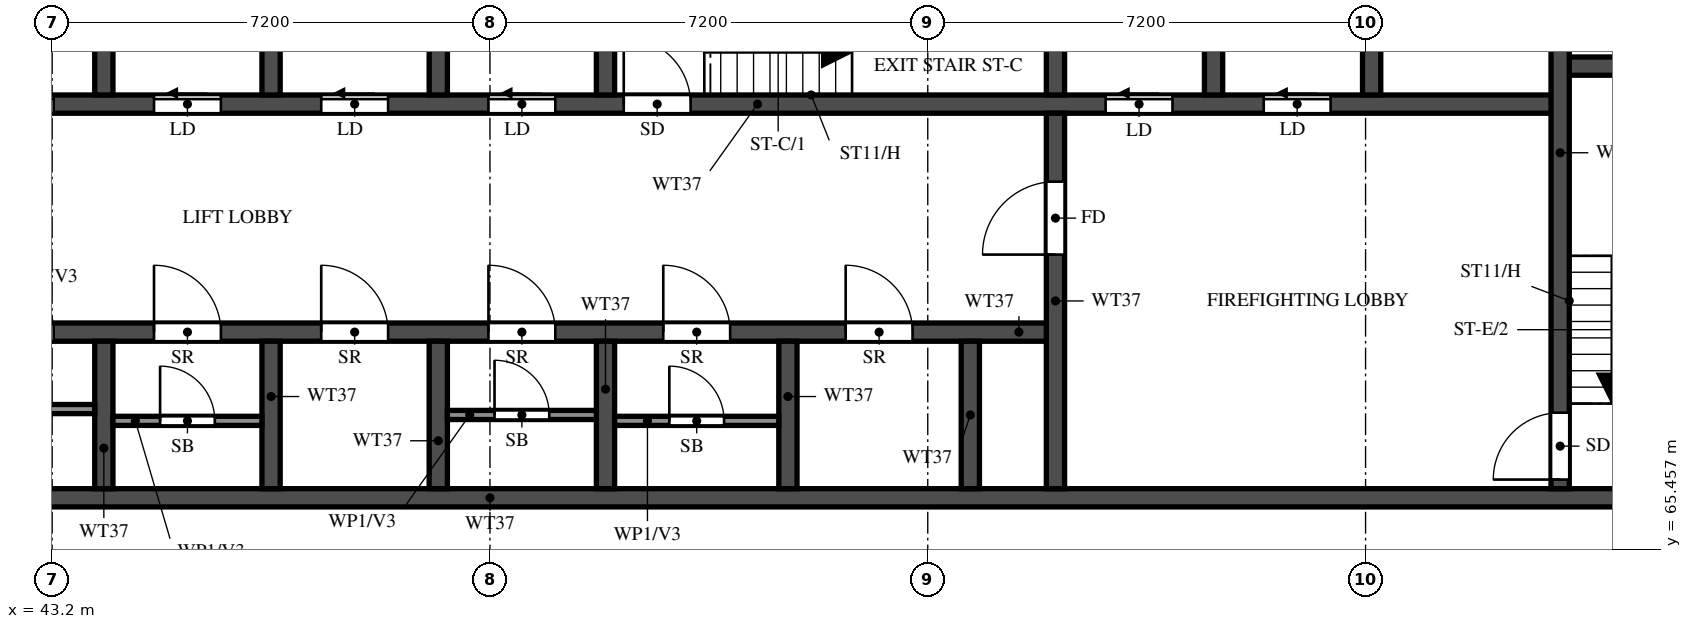
"""IFC4 building model, lengths in metres.
Left out: names, types, materials, properties, quantities, classifications, styles, units other than length and angle.
Written with IfcOpenShell. Run it as: python <this file> out.ifc"""

import sys

from ifc_helpers import new_model, si_unit, direction, frame, frame_2d, origin, place, context, subcontext, project, spatial, rectangle, extrude, element, fill, save


model = new_model("IFC4")
c1 = context("Model", 3, precision=1e-05, world=origin(), true_north=direction((0.0, 1.0)))
c2 = subcontext(c1, "Body", "Model", "MODEL_VIEW")
j1 = project(units=[si_unit("LENGTHUNIT", "METRE"), si_unit("PLANEANGLEUNIT", "RADIAN")], contexts=[c1])
p1 = place(None, origin())
s1 = spatial("IfcSite", under=j1, at=p1, CompositionType="ELEMENT")
p2 = place(p1, origin())
s2 = spatial("IfcBuilding", under=s1, at=p2, CompositionType="ELEMENT")
p3 = place(p2, frame((0.0, 0.0, 253.5)))
s3 = spatial("IfcBuildingStorey", under=s2, at=p3, CompositionType="ELEMENT", Elevation=253.5)
p4 = place(p3, frame((29.2, 66.3, 0.0), z_axis=(0.0, 0.0, 1.0), x_axis=(1.0, 0.0, 0.0)))
e1 = element("IfcWall", 1, at=p4, inside=s3, PredefinedType="SHEAR", context=c2, shape_type="SweptSolid", body=[
    extrude(rectangle(XDim=42.4, YDim=0.3, at=frame_2d((21.2, 0.0))), origin(), (0.0, 0.0, 1.0), 3.22),
])
p5 = place(p4, frame((1.425, 0.0, 0.0)))
e2 = element("IfcOpeningElement", 2, at=p5, cuts=e1, PredefinedType="OPENING", context=c2, shape_type="SweptSolid", body=[
    extrude(rectangle(XDim=1.1, YDim=2.1, at=frame_2d((0.55, 1.05))), frame((0.0, 0.16, 0.0), z_axis=(0.0, -1.0, 0.0), x_axis=(1.0, 0.0, 0.0)), (0.0, 0.0, 1.0), 0.32),
])
p6 = place(p4, frame((4.2, 0.0, 0.0)))
e3 = element("IfcOpeningElement", 3, at=p6, cuts=e1, PredefinedType="OPENING", context=c2, shape_type="SweptSolid", body=[
    extrude(rectangle(XDim=1.8, YDim=2.1, at=frame_2d((0.9, 1.05))), frame((0.0, 0.16, 0.0), z_axis=(0.0, -1.0, 0.0), x_axis=(1.0, 0.0, 0.0)), (0.0, 0.0, 1.0), 0.32),
])
p7 = place(p3, frame((35.65, 69.025, 0.0), z_axis=(0.0, 0.0, 1.0), x_axis=(1.0, 0.0, 0.0)))
e4 = element("IfcWall", 4, at=p7, inside=s3, PredefinedType="SHEAR", context=c2, shape_type="SweptSolid", body=[
    extrude(rectangle(XDim=24.05, YDim=0.3, at=frame_2d((12.025, 0.0))), origin(), (0.0, 0.0, 1.0), 3.22),
])
p8 = place(p7, frame((0.975, 0.0, 0.0)))
e5 = element("IfcOpeningElement", 5, at=p8, cuts=e4, PredefinedType="OPENING", context=c2, shape_type="SweptSolid", body=[
    extrude(rectangle(XDim=1.1, YDim=2.1, at=frame_2d((0.55, 1.05))), frame((0.0, 0.16, 0.0), z_axis=(0.0, -1.0, 0.0), x_axis=(1.0, 0.0, 0.0)), (0.0, 0.0, 1.0), 0.32),
])
p9 = place(p7, frame((3.725, 0.0, 0.0)))
e6 = element("IfcOpeningElement", 6, at=p9, cuts=e4, PredefinedType="OPENING", context=c2, shape_type="SweptSolid", body=[
    extrude(rectangle(XDim=1.1, YDim=2.1, at=frame_2d((0.55, 1.05))), frame((0.0, 0.16, 0.0), z_axis=(0.0, -1.0, 0.0), x_axis=(1.0, 0.0, 0.0)), (0.0, 0.0, 1.0), 0.32),
])
p10 = place(p7, frame((6.475, 0.0, 0.0)))
e7 = element("IfcOpeningElement", 7, at=p10, cuts=e4, PredefinedType="OPENING", context=c2, shape_type="SweptSolid", body=[
    extrude(rectangle(XDim=1.1, YDim=2.1, at=frame_2d((0.55, 1.05))), frame((0.0, 0.16, 0.0), z_axis=(0.0, -1.0, 0.0), x_axis=(1.0, 0.0, 0.0)), (0.0, 0.0, 1.0), 0.32),
])
p11 = place(p7, frame((9.225, 0.0, 0.0)))
e8 = element("IfcOpeningElement", 8, at=p11, cuts=e4, PredefinedType="OPENING", context=c2, shape_type="SweptSolid", body=[
    extrude(rectangle(XDim=1.1, YDim=2.1, at=frame_2d((0.55, 1.05))), frame((0.0, 0.16, 0.0), z_axis=(0.0, -1.0, 0.0), x_axis=(1.0, 0.0, 0.0)), (0.0, 0.0, 1.0), 0.32),
])
p12 = place(p7, frame((11.975, 0.0, 0.0)))
e9 = element("IfcOpeningElement", 9, at=p12, cuts=e4, PredefinedType="OPENING", context=c2, shape_type="SweptSolid", body=[
    extrude(rectangle(XDim=1.1, YDim=2.1, at=frame_2d((0.55, 1.05))), frame((0.0, 0.16, 0.0), z_axis=(0.0, -1.0, 0.0), x_axis=(1.0, 0.0, 0.0)), (0.0, 0.0, 1.0), 0.32),
])
p13 = place(p7, frame((14.725, 0.0, 0.0)))
e10 = element("IfcOpeningElement", 10, at=p13, cuts=e4, PredefinedType="OPENING", context=c2, shape_type="SweptSolid", body=[
    extrude(rectangle(XDim=1.1, YDim=2.1, at=frame_2d((0.55, 1.05))), frame((0.0, 0.16, 0.0), z_axis=(0.0, -1.0, 0.0), x_axis=(1.0, 0.0, 0.0)), (0.0, 0.0, 1.0), 0.32),
])
p14 = place(p7, frame((17.6, 0.0, 0.0)))
e11 = element("IfcOpeningElement", 11, at=p14, cuts=e4, PredefinedType="OPENING", context=c2, shape_type="SweptSolid", body=[
    extrude(rectangle(XDim=1.1, YDim=2.1, at=frame_2d((0.55, 1.05))), frame((0.0, 0.16, 0.0), z_axis=(0.0, -1.0, 0.0), x_axis=(1.0, 0.0, 0.0)), (0.0, 0.0, 1.0), 0.32),
])
p15 = place(p7, frame((20.6, 0.0, 0.0)))
e12 = element("IfcOpeningElement", 12, at=p15, cuts=e4, PredefinedType="OPENING", context=c2, shape_type="SweptSolid", body=[
    extrude(rectangle(XDim=1.1, YDim=2.1, at=frame_2d((0.55, 1.05))), frame((0.0, 0.16, 0.0), z_axis=(0.0, -1.0, 0.0), x_axis=(1.0, 0.0, 0.0)), (0.0, 0.0, 1.0), 0.32),
])
p16 = place(p3, frame((32.8, 72.775, 0.0), z_axis=(0.0, 0.0, 1.0), x_axis=(1.0, 0.0, 0.0)))
e13 = element("IfcWall", 13, at=p16, inside=s3, PredefinedType="SHEAR", context=c2, shape_type="SweptSolid", body=[
    extrude(rectangle(XDim=35.2, YDim=0.3, at=frame_2d((17.6, 0.0))), origin(), (0.0, 0.0, 1.0), 3.22),
])
p17 = place(p16, frame((19.8, 0.0, 0.0)))
e14 = element("IfcOpeningElement", 14, at=p17, cuts=e13, PredefinedType="OPENING", context=c2, shape_type="SweptSolid", body=[
    extrude(rectangle(XDim=1.1, YDim=2.1, at=frame_2d((0.55, 1.05))), frame((0.0, 0.16, 0.0), z_axis=(0.0, -1.0, 0.0), x_axis=(1.0, 0.0, 0.0)), (0.0, 0.0, 1.0), 0.32),
])
p18 = place(p16, frame((27.725, 0.0, 0.0)))
e15 = element("IfcOpeningElement", 15, at=p18, cuts=e13, PredefinedType="OPENING", context=c2, shape_type="SweptSolid", body=[
    extrude(rectangle(XDim=1.1, YDim=2.1, at=frame_2d((0.55, 1.05))), frame((0.0, 0.16, 0.0), z_axis=(0.0, -1.0, 0.0), x_axis=(1.0, 0.0, 0.0)), (0.0, 0.0, 1.0), 0.32),
])
p19 = place(p16, frame((30.325, 0.0, 0.0)))
e16 = element("IfcOpeningElement", 16, at=p19, cuts=e13, PredefinedType="OPENING", context=c2, shape_type="SweptSolid", body=[
    extrude(rectangle(XDim=1.1, YDim=2.1, at=frame_2d((0.55, 1.05))), frame((0.0, 0.16, 0.0), z_axis=(0.0, -1.0, 0.0), x_axis=(1.0, 0.0, 0.0)), (0.0, 0.0, 1.0), 0.32),
])
p20 = place(p16, frame((3.825, 0.0, 0.0)))
e17 = element("IfcOpeningElement", 17, at=p20, cuts=e13, PredefinedType="OPENING", context=c2, shape_type="SweptSolid", body=[
    extrude(rectangle(XDim=1.1, YDim=2.1, at=frame_2d((0.55, 1.05))), frame((0.0, 0.16, 0.0), z_axis=(0.0, -1.0, 0.0), x_axis=(1.0, 0.0, 0.0)), (0.0, 0.0, 1.0), 0.32),
])
p21 = place(p16, frame((6.575, 0.0, 0.0)))
e18 = element("IfcOpeningElement", 18, at=p21, cuts=e13, PredefinedType="OPENING", context=c2, shape_type="SweptSolid", body=[
    extrude(rectangle(XDim=1.1, YDim=2.1, at=frame_2d((0.55, 1.05))), frame((0.0, 0.16, 0.0), z_axis=(0.0, -1.0, 0.0), x_axis=(1.0, 0.0, 0.0)), (0.0, 0.0, 1.0), 0.32),
])
p22 = place(p16, frame((9.325, 0.0, 0.0)))
e19 = element("IfcOpeningElement", 19, at=p22, cuts=e13, PredefinedType="OPENING", context=c2, shape_type="SweptSolid", body=[
    extrude(rectangle(XDim=1.1, YDim=2.1, at=frame_2d((0.55, 1.05))), frame((0.0, 0.16, 0.0), z_axis=(0.0, -1.0, 0.0), x_axis=(1.0, 0.0, 0.0)), (0.0, 0.0, 1.0), 0.32),
])
p23 = place(p16, frame((12.075, 0.0, 0.0)))
e20 = element("IfcOpeningElement", 20, at=p23, cuts=e13, PredefinedType="OPENING", context=c2, shape_type="SweptSolid", body=[
    extrude(rectangle(XDim=1.1, YDim=2.1, at=frame_2d((0.55, 1.05))), frame((0.0, 0.16, 0.0), z_axis=(0.0, -1.0, 0.0), x_axis=(1.0, 0.0, 0.0)), (0.0, 0.0, 1.0), 0.32),
])
p24 = place(p16, frame((14.825, 0.0, 0.0)))
e21 = element("IfcOpeningElement", 21, at=p24, cuts=e13, PredefinedType="OPENING", context=c2, shape_type="SweptSolid", body=[
    extrude(rectangle(XDim=1.1, YDim=2.1, at=frame_2d((0.55, 1.05))), frame((0.0, 0.16, 0.0), z_axis=(0.0, -1.0, 0.0), x_axis=(1.0, 0.0, 0.0)), (0.0, 0.0, 1.0), 0.32),
])
p25 = place(p16, frame((17.575, 0.0, 0.0)))
e22 = element("IfcOpeningElement", 22, at=p25, cuts=e13, PredefinedType="OPENING", context=c2, shape_type="SweptSolid", body=[
    extrude(rectangle(XDim=1.1, YDim=2.1, at=frame_2d((0.55, 1.05))), frame((0.0, 0.16, 0.0), z_axis=(0.0, -1.0, 0.0), x_axis=(1.0, 0.0, 0.0)), (0.0, 0.0, 1.0), 0.32),
])
p26 = place(p16, frame((0.95, 0.0, 0.0)))
e23 = element("IfcOpeningElement", 23, at=p26, cuts=e13, PredefinedType="OPENING", context=c2, shape_type="SweptSolid", body=[
    extrude(rectangle(XDim=1.1, YDim=2.1, at=frame_2d((0.55, 1.05))), frame((0.0, 0.16, 0.0), z_axis=(0.0, -1.0, 0.0), x_axis=(1.0, 0.0, 0.0)), (0.0, 0.0, 1.0), 0.32),
])
p27 = place(p3, frame((68.0, 73.4, 0.0), z_axis=(0.0, 0.0, 1.0), x_axis=(1.0, 0.0, 0.0)))
e24 = element("IfcWall", 24, at=p27, inside=s3, PredefinedType="SHEAR", context=c2, shape_type="SweptSolid", body=[
    extrude(rectangle(XDim=3.1, YDim=0.3, at=frame_2d((1.55, 0.0))), origin(), (0.0, 0.0, 1.0), 3.22),
])
p28 = place(p3, frame((68.0, 66.45, 0.0), z_axis=(0.0, 0.0, 1.0), x_axis=(0.0, 1.0, 0.0)))
e25 = element("IfcWall", 25, at=p28, inside=s3, PredefinedType="SHEAR", context=c2, shape_type="SweptSolid", body=[
    extrude(rectangle(XDim=11.05, YDim=0.3, at=frame_2d((5.525, 0.0))), origin(), (0.0, 0.0, 1.0), 3.22),
])
p29 = place(p28, frame((0.15, 0.0, 0.0)))
e26 = element("IfcOpeningElement", 26, at=p29, cuts=e25, PredefinedType="OPENING", context=c2, shape_type="SweptSolid", body=[
    extrude(rectangle(XDim=1.1, YDim=2.1, at=frame_2d((0.55, 1.05))), frame((0.0, 0.16, 0.0), z_axis=(0.0, -1.0, 0.0), x_axis=(1.0, 0.0, 0.0)), (0.0, 0.0, 1.0), 0.32),
])
p30 = place(p3, frame((59.7, 66.45, 0.0), z_axis=(0.0, 0.0, 1.0), x_axis=(0.0, 1.0, 0.0)))
e27 = element("IfcWall", 27, at=p30, inside=s3, PredefinedType="SHEAR", context=c2, shape_type="SweptSolid", body=[
    extrude(rectangle(XDim=6.175, YDim=0.3, at=frame_2d((3.087, 0.0))), origin(), (0.0, 0.0, 1.0), 3.22),
])
p31 = place(p30, frame((3.85, 0.0, 0.0)))
e28 = element("IfcOpeningElement", 28, at=p31, cuts=e27, PredefinedType="OPENING", context=c2, shape_type="SweptSolid", body=[
    extrude(rectangle(XDim=1.2, YDim=2.1, at=frame_2d((0.6, 1.05))), frame((0.0, 0.16, 0.0), z_axis=(0.0, -1.0, 0.0), x_axis=(1.0, 0.0, 0.0)), (0.0, 0.0, 1.0), 0.32),
])
p32 = place(p3, frame((59.7, 72.925, 0.0), z_axis=(0.0, 0.0, 1.0), x_axis=(0.0, 1.0, 0.0)))
e29 = element("IfcWall", 29, at=p32, inside=s3, PredefinedType="SHEAR", context=c2, shape_type="SweptSolid", body=[
    extrude(rectangle(XDim=2.95, YDim=0.3, at=frame_2d((1.475, 0.0))), origin(), (0.0, 0.0, 1.0), 3.22),
])
for number, where, z_axis, x_axis in (
    (30, (44.05, 66.45, 0.0), (0.0, 0.0, 1.0), (0.0, 1.0, 0.0)),
    (31, (46.8, 66.45, 0.0), (0.0, 0.0, 1.0), (0.0, 1.0, 0.0)),
    (32, (49.55, 66.45, 0.0), (0.0, 0.0, 1.0), (0.0, 1.0, 0.0)),
    (33, (52.3, 66.45, 0.0), (0.0, 0.0, 1.0), (0.0, 1.0, 0.0)),
    (34, (55.3, 66.45, 0.0), (0.0, 0.0, 1.0), (0.0, 1.0, 0.0)),
    (35, (58.3, 66.45, 0.0), (0.0, 0.0, 1.0), (0.0, 1.0, 0.0)),
):
    element("IfcWall", number, at=place(p3, frame(where, z_axis=z_axis, x_axis=x_axis)), inside=s3, PredefinedType="SHEAR", context=c2, shape_type="SweptSolid", body=[
        extrude(rectangle(XDim=2.425, YDim=0.3, at=frame_2d((1.212, 0.0))), origin(), (0.0, 0.0, 1.0), 3.22),
    ])
for number, where, z_axis, x_axis in (
    (36, (44.05, 72.925, 0.0), (0.0, 0.0, 1.0), (0.0, 1.0, 0.0)),
    (37, (46.8, 72.925, 0.0), (0.0, 0.0, 1.0), (0.0, 1.0, 0.0)),
    (38, (49.55, 72.925, 0.0), (0.0, 0.0, 1.0), (0.0, 1.0, 0.0)),
    (39, (52.3, 72.925, 0.0), (0.0, 0.0, 1.0), (0.0, 1.0, 0.0)),
    (40, (62.3, 72.925, 0.0), (0.0, 0.0, 1.0), (0.0, 1.0, 0.0)),
    (41, (64.9, 72.925, 0.0), (0.0, 0.0, 1.0), (0.0, 1.0, 0.0)),
):
    element("IfcWall", number, at=place(p3, frame(where, z_axis=z_axis, x_axis=x_axis)), inside=s3, PredefinedType="SHEAR", context=c2, shape_type="SweptSolid", body=[
        extrude(rectangle(XDim=2.95, YDim=0.3, at=frame_2d((1.475, 0.0))), origin(), (0.0, 0.0, 1.0), 3.22),
    ])
p33 = place(p3, frame((41.45, 67.76, 0.0), z_axis=(0.0, 0.0, 1.0), x_axis=(1.0, 0.0, 0.0)))
e42 = element("IfcWall", 42, at=p33, inside=s3, PredefinedType="PARTITIONING", context=c2, shape_type="SweptSolid", body=[
    extrude(rectangle(XDim=2.45, YDim=0.15, at=frame_2d((1.225, 0.0))), origin(), (0.0, 0.0, 1.0), 3.22),
])
p34 = place(p33, frame((0.775, 0.0, 0.0)))
e43 = element("IfcOpeningElement", 43, at=p34, cuts=e42, PredefinedType="OPENING", context=c2, shape_type="SweptSolid", body=[
    extrude(rectangle(XDim=0.9, YDim=2.1, at=frame_2d((0.45, 1.05))), frame((0.0, 0.085, 0.0), z_axis=(0.0, -1.0, 0.0), x_axis=(1.0, 0.0, 0.0)), (0.0, 0.0, 1.0), 0.17),
])
p35 = place(p3, frame((44.2, 67.565, 0.0), z_axis=(0.0, 0.0, 1.0), x_axis=(1.0, 0.0, 0.0)))
e44 = element("IfcWall", 44, at=p35, inside=s3, PredefinedType="PARTITIONING", context=c2, shape_type="SweptSolid", body=[
    extrude(rectangle(XDim=2.45, YDim=0.15, at=frame_2d((1.225, 0.0))), origin(), (0.0, 0.0, 1.0), 3.22),
])
p36 = place(p35, frame((0.775, 0.0, 0.0)))
e45 = element("IfcOpeningElement", 45, at=p36, cuts=e44, PredefinedType="OPENING", context=c2, shape_type="SweptSolid", body=[
    extrude(rectangle(XDim=0.9, YDim=2.1, at=frame_2d((0.45, 1.05))), frame((0.0, 0.085, 0.0), z_axis=(0.0, -1.0, 0.0), x_axis=(1.0, 0.0, 0.0)), (0.0, 0.0, 1.0), 0.17),
])
p37 = place(p3, frame((49.7, 67.663, 0.0), z_axis=(0.0, 0.0, 1.0), x_axis=(1.0, 0.0, 0.0)))
e46 = element("IfcWall", 46, at=p37, inside=s3, PredefinedType="PARTITIONING", context=c2, shape_type="SweptSolid", body=[
    extrude(rectangle(XDim=2.45, YDim=0.15, at=frame_2d((1.225, 0.0))), origin(), (0.0, 0.0, 1.0), 3.22),
])
p38 = place(p37, frame((0.775, 0.0, 0.0)))
e47 = element("IfcOpeningElement", 47, at=p38, cuts=e46, PredefinedType="OPENING", context=c2, shape_type="SweptSolid", body=[
    extrude(rectangle(XDim=0.9, YDim=2.1, at=frame_2d((0.45, 1.05))), frame((0.0, 0.085, 0.0), z_axis=(0.0, -1.0, 0.0), x_axis=(1.0, 0.0, 0.0)), (0.0, 0.0, 1.0), 0.17),
])
p39 = place(p3, frame((52.45, 67.565, 0.0), z_axis=(0.0, 0.0, 1.0), x_axis=(1.0, 0.0, 0.0)))
e48 = element("IfcWall", 48, at=p39, inside=s3, PredefinedType="PARTITIONING", context=c2, shape_type="SweptSolid", body=[
    extrude(rectangle(XDim=2.7, YDim=0.15, at=frame_2d((1.35, 0.0))), origin(), (0.0, 0.0, 1.0), 3.22),
])
p40 = place(p39, frame((0.9, 0.0, 0.0)))
e49 = element("IfcOpeningElement", 49, at=p40, cuts=e48, PredefinedType="OPENING", context=c2, shape_type="SweptSolid", body=[
    extrude(rectangle(XDim=0.9, YDim=2.1, at=frame_2d((0.45, 1.05))), frame((0.0, 0.085, 0.0), z_axis=(0.0, -1.0, 0.0), x_axis=(1.0, 0.0, 0.0)), (0.0, 0.0, 1.0), 0.17),
])
p41 = place(p17, origin())
e50 = element("IfcDoor", 50, at=p41, inside=s3, OperationType="SINGLE_SWING_LEFT", PredefinedType="DOOR", context=c2, shape_type="SweptSolid", body=[
    extrude(rectangle(XDim=1.1, YDim=2.1, at=frame_2d((0.55, 1.05))), frame((0.0, 0.025, 0.0), z_axis=(0.0, -1.0, 0.0), x_axis=(1.0, 0.0, 0.0)), (0.0, 0.0, 1.0), 0.05),
])
fill(e14, e50)
p42 = place(p29, origin())
e51 = element("IfcDoor", 51, at=p42, inside=s3, OperationType="SINGLE_SWING_RIGHT", PredefinedType="DOOR", context=c2, shape_type="SweptSolid", body=[
    extrude(rectangle(XDim=1.1, YDim=2.1, at=frame_2d((0.55, 1.05))), frame((0.0, 0.025, 0.0), z_axis=(0.0, -1.0, 0.0), x_axis=(1.0, 0.0, 0.0)), (0.0, 0.0, 1.0), 0.05),
])
fill(e26, e51)
p43 = place(p31, origin())
e52 = element("IfcDoor", 52, at=p43, inside=s3, OperationType="SINGLE_SWING_LEFT", PredefinedType="DOOR", context=c2, shape_type="SweptSolid", body=[
    extrude(rectangle(XDim=1.2, YDim=2.1, at=frame_2d((0.6, 1.05))), frame((0.0, 0.025, 0.0), z_axis=(0.0, -1.0, 0.0), x_axis=(1.0, 0.0, 0.0)), (0.0, 0.0, 1.0), 0.05),
])
fill(e28, e52)
p44 = place(p18, origin())
e53 = element("IfcDoor", 53, at=p44, inside=s3, OperationType="SLIDING_TO_LEFT", PredefinedType="DOOR", context=c2, shape_type="SweptSolid", body=[
    extrude(rectangle(XDim=1.1, YDim=2.1, at=frame_2d((0.55, 1.05))), frame((0.0, 0.025, 0.0), z_axis=(0.0, -1.0, 0.0), x_axis=(1.0, 0.0, 0.0)), (0.0, 0.0, 1.0), 0.05),
])
fill(e15, e53)
p45 = place(p19, origin())
e54 = element("IfcDoor", 54, at=p45, inside=s3, OperationType="SLIDING_TO_LEFT", PredefinedType="DOOR", context=c2, shape_type="SweptSolid", body=[
    extrude(rectangle(XDim=1.1, YDim=2.1, at=frame_2d((0.55, 1.05))), frame((0.0, 0.025, 0.0), z_axis=(0.0, -1.0, 0.0), x_axis=(1.0, 0.0, 0.0)), (0.0, 0.0, 1.0), 0.05),
])
fill(e16, e54)
p46 = place(p10, origin())
e55 = element("IfcDoor", 55, at=p46, inside=s3, OperationType="SINGLE_SWING_RIGHT", PredefinedType="DOOR", context=c2, shape_type="SweptSolid", body=[
    extrude(rectangle(XDim=1.1, YDim=2.1, at=frame_2d((0.55, 1.05))), frame((0.0, 0.025, 0.0), z_axis=(0.0, -1.0, 0.0), x_axis=(1.0, 0.0, 0.0)), (0.0, 0.0, 1.0), 0.05),
])
fill(e7, e55)
p47 = place(p11, origin())
e56 = element("IfcDoor", 56, at=p47, inside=s3, OperationType="SINGLE_SWING_LEFT", PredefinedType="DOOR", context=c2, shape_type="SweptSolid", body=[
    extrude(rectangle(XDim=1.1, YDim=2.1, at=frame_2d((0.55, 1.05))), frame((0.0, 0.025, 0.0), z_axis=(0.0, -1.0, 0.0), x_axis=(1.0, 0.0, 0.0)), (0.0, 0.0, 1.0), 0.05),
])
fill(e8, e56)
p48 = place(p36, origin())
e57 = element("IfcDoor", 57, at=p48, inside=s3, OperationType="SINGLE_SWING_LEFT", PredefinedType="DOOR", context=c2, shape_type="SweptSolid", body=[
    extrude(rectangle(XDim=0.9, YDim=2.1, at=frame_2d((0.45, 1.05))), frame((0.0, 0.025, 0.0), z_axis=(0.0, -1.0, 0.0), x_axis=(1.0, 0.0, 0.0)), (0.0, 0.0, 1.0), 0.05),
])
fill(e45, e57)
p49 = place(p12, origin())
e58 = element("IfcDoor", 58, at=p49, inside=s3, OperationType="SINGLE_SWING_RIGHT", PredefinedType="DOOR", context=c2, shape_type="SweptSolid", body=[
    extrude(rectangle(XDim=1.1, YDim=2.1, at=frame_2d((0.55, 1.05))), frame((0.0, 0.025, 0.0), z_axis=(0.0, -1.0, 0.0), x_axis=(1.0, 0.0, 0.0)), (0.0, 0.0, 1.0), 0.05),
])
fill(e9, e58)
p50 = place(p13, origin())
e59 = element("IfcDoor", 59, at=p50, inside=s3, OperationType="SINGLE_SWING_LEFT", PredefinedType="DOOR", context=c2, shape_type="SweptSolid", body=[
    extrude(rectangle(XDim=1.1, YDim=2.1, at=frame_2d((0.55, 1.05))), frame((0.0, 0.025, 0.0), z_axis=(0.0, -1.0, 0.0), x_axis=(1.0, 0.0, 0.0)), (0.0, 0.0, 1.0), 0.05),
])
fill(e10, e59)
p51 = place(p38, origin())
e60 = element("IfcDoor", 60, at=p51, inside=s3, OperationType="SINGLE_SWING_LEFT", PredefinedType="DOOR", context=c2, shape_type="SweptSolid", body=[
    extrude(rectangle(XDim=0.9, YDim=2.1, at=frame_2d((0.45, 1.05))), frame((0.0, 0.025, 0.0), z_axis=(0.0, -1.0, 0.0), x_axis=(1.0, 0.0, 0.0)), (0.0, 0.0, 1.0), 0.05),
])
fill(e47, e60)
p52 = place(p14, origin())
e61 = element("IfcDoor", 61, at=p52, inside=s3, OperationType="SINGLE_SWING_RIGHT", PredefinedType="DOOR", context=c2, shape_type="SweptSolid", body=[
    extrude(rectangle(XDim=1.1, YDim=2.1, at=frame_2d((0.55, 1.05))), frame((0.0, 0.025, 0.0), z_axis=(0.0, -1.0, 0.0), x_axis=(1.0, 0.0, 0.0)), (0.0, 0.0, 1.0), 0.05),
])
fill(e11, e61)
p53 = place(p40, origin())
e62 = element("IfcDoor", 62, at=p53, inside=s3, OperationType="SINGLE_SWING_RIGHT", PredefinedType="DOOR", context=c2, shape_type="SweptSolid", body=[
    extrude(rectangle(XDim=0.9, YDim=2.1, at=frame_2d((0.45, 1.05))), frame((0.0, 0.025, 0.0), z_axis=(0.0, -1.0, 0.0), x_axis=(1.0, 0.0, 0.0)), (0.0, 0.0, 1.0), 0.05),
])
fill(e49, e62)
p54 = place(p15, origin())
e63 = element("IfcDoor", 63, at=p54, inside=s3, OperationType="SINGLE_SWING_RIGHT", PredefinedType="DOOR", context=c2, shape_type="SweptSolid", body=[
    extrude(rectangle(XDim=1.1, YDim=2.1, at=frame_2d((0.55, 1.05))), frame((0.0, 0.025, 0.0), z_axis=(0.0, -1.0, 0.0), x_axis=(1.0, 0.0, 0.0)), (0.0, 0.0, 1.0), 0.05),
])
fill(e12, e63)
p55 = place(p22, origin())
e64 = element("IfcDoor", 64, at=p55, inside=s3, OperationType="SLIDING_TO_LEFT", PredefinedType="DOOR", context=c2, shape_type="SweptSolid", body=[
    extrude(rectangle(XDim=1.1, YDim=2.1, at=frame_2d((0.55, 1.05))), frame((0.0, 0.025, 0.0), z_axis=(0.0, -1.0, 0.0), x_axis=(1.0, 0.0, 0.0)), (0.0, 0.0, 1.0), 0.05),
])
fill(e19, e64)
p56 = place(p23, origin())
e65 = element("IfcDoor", 65, at=p56, inside=s3, OperationType="SLIDING_TO_LEFT", PredefinedType="DOOR", context=c2, shape_type="SweptSolid", body=[
    extrude(rectangle(XDim=1.1, YDim=2.1, at=frame_2d((0.55, 1.05))), frame((0.0, 0.025, 0.0), z_axis=(0.0, -1.0, 0.0), x_axis=(1.0, 0.0, 0.0)), (0.0, 0.0, 1.0), 0.05),
])
fill(e20, e65)
p57 = place(p24, origin())
e66 = element("IfcDoor", 66, at=p57, inside=s3, OperationType="SLIDING_TO_LEFT", PredefinedType="DOOR", context=c2, shape_type="SweptSolid", body=[
    extrude(rectangle(XDim=1.1, YDim=2.1, at=frame_2d((0.55, 1.05))), frame((0.0, 0.025, 0.0), z_axis=(0.0, -1.0, 0.0), x_axis=(1.0, 0.0, 0.0)), (0.0, 0.0, 1.0), 0.05),
])
fill(e21, e66)
p58 = place(p25, origin())
e67 = element("IfcDoor", 67, at=p58, inside=s3, OperationType="SLIDING_TO_LEFT", PredefinedType="DOOR", context=c2, shape_type="SweptSolid", body=[
    extrude(rectangle(XDim=1.1, YDim=2.1, at=frame_2d((0.55, 1.05))), frame((0.0, 0.025, 0.0), z_axis=(0.0, -1.0, 0.0), x_axis=(1.0, 0.0, 0.0)), (0.0, 0.0, 1.0), 0.05),
])
fill(e22, e67)
save(model, sys.argv[1])
